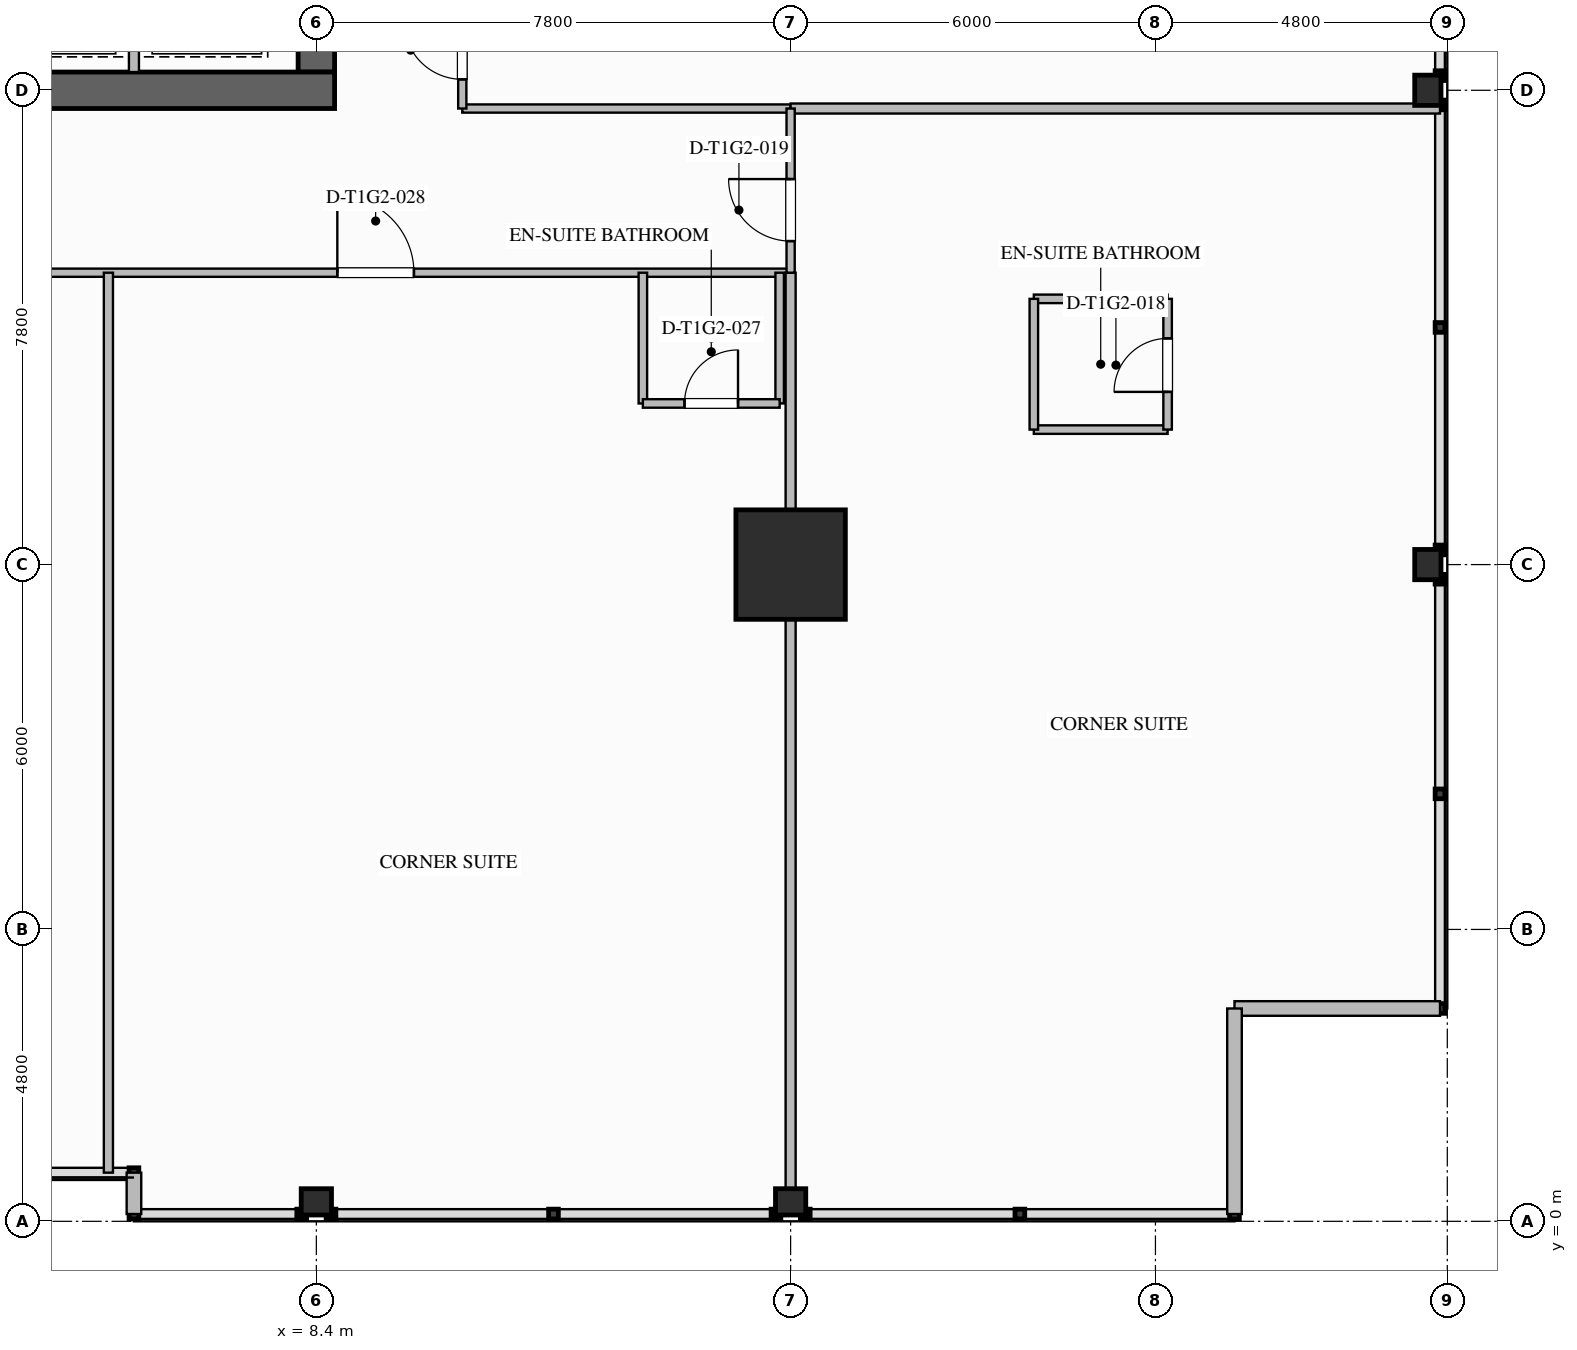
"""IFC4 building model, lengths in metres.
Left out: names, types, materials, properties, quantities, classifications, styles, units other than length and angle.
Written with IfcOpenShell. Run it as: python <this file> out.ifc"""

import sys

from ifc_helpers import new_model, si_unit, direction, frame, frame_2d, origin, origin_2d, place, context, subcontext, project, spatial, rectangle, i_section, extrude, element, fill, save


model = new_model("IFC4")
c1 = context("Model", 3, precision=1e-05, world=origin(), true_north=direction((0.0, 1.0)))
c2 = subcontext(c1, "Body", "Model", "MODEL_VIEW")
j1 = project(units=[si_unit("LENGTHUNIT", "METRE"), si_unit("PLANEANGLEUNIT", "RADIAN")], contexts=[c1])
p1 = place(None, origin())
s1 = spatial("IfcSite", under=j1, at=p1, CompositionType="ELEMENT")
p2 = place(p1, origin())
s2 = spatial("IfcBuilding", under=s1, at=p2, CompositionType="ELEMENT")
p3 = place(p2, frame((0.0, 0.0, 43.7)))
s3 = spatial("IfcBuildingStorey", under=s2, at=p3, CompositionType="ELEMENT", Elevation=43.7)
p4 = place(p3, frame((8.4, 35.1, 0.0), z_axis=(0.0, 0.0, 1.0), x_axis=(0.0, -1.0, 0.0)))
e1 = element("IfcWall", 1, at=p4, inside=s3, PredefinedType="SHEAR", context=c2, shape_type="SweptSolid", body=[
    extrude(rectangle(XDim=16.2, YDim=0.6, at=frame_2d((8.1, 0.0))), origin(), (0.0, 0.0, 1.0), 3.5),
])
p5 = place(p4, frame((3.08, 0.0, 0.0)))
e2 = element("IfcOpeningElement", 2, at=p5, cuts=e1, PredefinedType="OPENING", context=c2, shape_type="SweptSolid", body=[
    extrude(rectangle(XDim=1.12, YDim=2.1, at=frame_2d((0.56, 1.05))), frame((0.0, 0.31, 0.0), z_axis=(0.0, -1.0, 0.0), x_axis=(1.0, 0.0, 0.0)), (0.0, 0.0, 1.0), 0.62),
])
p6 = place(p3, frame((8.7, 18.6, 0.0), z_axis=(0.0, 0.0, 1.0), x_axis=(-1.0, 0.0, 0.0)))
e3 = element("IfcWall", 3, at=p6, inside=s3, PredefinedType="SHEAR", context=c2, shape_type="SweptSolid", body=[
    extrude(rectangle(XDim=17.4, YDim=0.6, at=frame_2d((8.7, 0.0))), origin(), (0.0, 0.0, 1.0), 3.5),
])
p7 = place(p3, frame((16.2, 10.8, 0.0), z_axis=(0.0, 0.0, 1.0), x_axis=(1.0, 0.0, 0.0)))
e4 = element("IfcColumn", 4, at=p7, inside=s3, PredefinedType="COLUMN", context=c2, shape_type="SweptSolid", body=[
    extrude(rectangle(XDim=1.8, YDim=1.8, at=origin_2d()), origin(), (0.0, 0.0, 1.0), 3.5),
])
for number, where, z_axis, x_axis in (
    (5, (26.68, 10.8, 0.0), (0.0, 0.0, 1.0), (1.0, 0.0, 0.0)),
    (6, (26.68, 18.6, 0.0), (0.0, 0.0, 1.0), (1.0, 0.0, 0.0)),
    (7, (8.4, 0.32, 0.0), (0.0, 0.0, 1.0), (0.0, 1.0, 0.0)),
    (8, (16.2, 0.32, 0.0), (0.0, 0.0, 1.0), (0.0, 1.0, 0.0)),
):
    element("IfcColumn", number, at=place(p3, frame(where, z_axis=z_axis, x_axis=x_axis)), inside=s3, PredefinedType="COLUMN", context=c2, shape_type="SweptSolid", body=[
        extrude(i_section(OverallWidth=0.432, OverallDepth=0.498, WebThickness=0.056, FlangeThickness=0.089, FilletRadius=0.03, at=origin_2d()), origin(), (0.0, 0.0, 1.0), 3.497),
    ])
for number, where, z_axis, x_axis in (
    (9, (26.88, 3.5, 0.0), (0.0, 0.0, 1.0), (-1.0, 0.0, 0.0)),
    (10, (23.5, 3.5, 0.0), (0.0, 0.0, 1.0), (0.0, -1.0, 0.0)),
):
    element("IfcWall", number, at=place(p3, frame(where, z_axis=z_axis, x_axis=x_axis)), inside=s3, PredefinedType="STANDARD", context=c2, shape_type="SweptSolid", body=[
        extrude(rectangle(XDim=3.38, YDim=0.24, at=frame_2d((1.69, 0.0))), origin(), (0.0, 0.0, 1.0), 3.24),
    ])
p8 = place(p3, frame((5.4, 0.12, 0.0), z_axis=(0.0, 0.0, 1.0), x_axis=(0.0, 1.0, 0.0)))
e11 = element("IfcWall", 11, at=p8, inside=s3, PredefinedType="STANDARD", context=c2, shape_type="SweptSolid", body=[
    extrude(rectangle(XDim=0.68, YDim=0.24, at=frame_2d((0.34, 0.0))), origin(), (0.0, 0.0, 1.0), 3.24),
])
p9 = place(p3, frame((5.4, 18.9, 0.0), z_axis=(0.0, 0.0, 1.0), x_axis=(0.0, 1.0, 0.0)))
e12 = element("IfcWall", 12, at=p9, inside=s3, PredefinedType="PARTITIONING", context=c2, shape_type="SweptSolid", body=[
    extrude(rectangle(XDim=2.88, YDim=0.165, at=frame_2d((1.44, 0.0))), origin(), (0.0, 0.0, 1.0), 3.24),
])
p10 = place(p3, frame((-16.2, 15.6, 0.0), z_axis=(0.0, 0.0, 1.0), x_axis=(1.0, 0.0, 0.0)))
e13 = element("IfcWall", 13, at=p10, inside=s3, PredefinedType="PARTITIONING", context=c2, shape_type="SweptSolid", body=[
    extrude(rectangle(XDim=32.4, YDim=0.135, at=frame_2d((16.2, 0.0))), origin(), (0.0, 0.0, 1.0), 3.24),
])
p11 = place(p10, frame((4.23, 0.0, 0.0)))
e14 = element("IfcOpeningElement", 14, at=p11, cuts=e13, PredefinedType="OPENING", context=c2, shape_type="SweptSolid", body=[
    extrude(rectangle(XDim=1.26, YDim=2.2, at=frame_2d((0.63, 1.1))), frame((0.0, 0.077, 0.0), z_axis=(0.0, -1.0, 0.0), x_axis=(1.0, 0.0, 0.0)), (0.0, 0.0, 1.0), 0.155),
])
p12 = place(p10, frame((16.155, 0.0, 0.0)))
e15 = element("IfcOpeningElement", 15, at=p12, cuts=e13, PredefinedType="OPENING", context=c2, shape_type="SweptSolid", body=[
    extrude(rectangle(XDim=1.02, YDim=2.15, at=frame_2d((0.51, 1.075))), frame((0.0, 0.077, 0.0), z_axis=(0.0, -1.0, 0.0), x_axis=(1.0, 0.0, 0.0)), (0.0, 0.0, 1.0), 0.155),
])
p13 = place(p10, frame((24.945, 0.0, 0.0)))
e16 = element("IfcOpeningElement", 16, at=p13, cuts=e13, PredefinedType="OPENING", context=c2, shape_type="SweptSolid", body=[
    extrude(rectangle(XDim=1.26, YDim=2.2, at=frame_2d((0.63, 1.1))), frame((0.0, 0.077, 0.0), z_axis=(0.0, -1.0, 0.0), x_axis=(1.0, 0.0, 0.0)), (0.0, 0.0, 1.0), 0.155),
])
p14 = place(p3, frame((10.8, 18.3, 0.0), z_axis=(0.0, 0.0, 1.0), x_axis=(1.0, 0.0, 0.0)))
e17 = element("IfcWall", 17, at=p14, inside=s3, PredefinedType="PARTITIONING", context=c2, shape_type="SweptSolid", body=[
    extrude(rectangle(XDim=5.4, YDim=0.135, at=frame_2d((2.7, 0.0))), origin(), (0.0, 0.0, 1.0), 3.24),
])
p15 = place(p3, frame((10.8, 18.3, 0.0), z_axis=(0.0, 0.0, 1.0), x_axis=(0.0, 1.0, 0.0)))
e18 = element("IfcWall", 18, at=p15, inside=s3, PredefinedType="PARTITIONING", context=c2, shape_type="SweptSolid", body=[
    extrude(rectangle(XDim=17.4, YDim=0.135, at=frame_2d((8.7, 0.0))), origin(), (0.0, 0.0, 1.0), 3.24),
])
p16 = place(p15, frame((0.48, 0.0, 0.0)))
e19 = element("IfcOpeningElement", 19, at=p16, cuts=e18, PredefinedType="OPENING", context=c2, shape_type="SweptSolid", body=[
    extrude(rectangle(XDim=0.96, YDim=2.15, at=frame_2d((0.48, 1.075))), frame((0.0, 0.077, 0.0), z_axis=(0.0, -1.0, 0.0), x_axis=(1.0, 0.0, 0.0)), (0.0, 0.0, 1.0), 0.155),
])
p17 = place(p15, frame((4.83, 0.0, 0.0)))
e20 = element("IfcOpeningElement", 20, at=p17, cuts=e18, PredefinedType="OPENING", context=c2, shape_type="SweptSolid", body=[
    extrude(rectangle(XDim=0.96, YDim=2.15, at=frame_2d((0.48, 1.075))), frame((0.0, 0.077, 0.0), z_axis=(0.0, -1.0, 0.0), x_axis=(1.0, 0.0, 0.0)), (0.0, 0.0, 1.0), 0.155),
])
p18 = place(p15, frame((9.18, 0.0, 0.0)))
e21 = element("IfcOpeningElement", 21, at=p18, cuts=e18, PredefinedType="OPENING", context=c2, shape_type="SweptSolid", body=[
    extrude(rectangle(XDim=0.96, YDim=2.15, at=frame_2d((0.48, 1.075))), frame((0.0, 0.077, 0.0), z_axis=(0.0, -1.0, 0.0), x_axis=(1.0, 0.0, 0.0)), (0.0, 0.0, 1.0), 0.155),
])
p19 = place(p15, frame((13.53, 0.0, 0.0)))
e22 = element("IfcOpeningElement", 22, at=p19, cuts=e18, PredefinedType="OPENING", context=c2, shape_type="SweptSolid", body=[
    extrude(rectangle(XDim=0.96, YDim=2.15, at=frame_2d((0.48, 1.075))), frame((0.0, 0.077, 0.0), z_axis=(0.0, -1.0, 0.0), x_axis=(1.0, 0.0, 0.0)), (0.0, 0.0, 1.0), 0.155),
])
p20 = place(p3, frame((16.2, 0.12, 0.0), z_axis=(0.0, 0.0, 1.0), x_axis=(0.0, 1.0, 0.0)))
e23 = element("IfcWall", 23, at=p20, inside=s3, PredefinedType="PARTITIONING", context=c2, shape_type="SweptSolid", body=[
    extrude(rectangle(XDim=15.48, YDim=0.165, at=frame_2d((7.74, 0.0))), origin(), (0.0, 0.0, 1.0), 2.298),
])
p21 = place(p3, frame((16.2, 18.3, 0.0), z_axis=(0.0, 0.0, 1.0), x_axis=(1.0, 0.0, 0.0)))
e24 = element("IfcWall", 24, at=p21, inside=s3, PredefinedType="PARTITIONING", context=c2, shape_type="SweptSolid", body=[
    extrude(rectangle(XDim=10.68, YDim=0.165, at=frame_2d((5.34, 0.0))), origin(), (0.0, 0.0, 1.0), 2.298),
])
p22 = place(p3, frame((16.2, 15.6, 0.0), z_axis=(0.0, 0.0, 1.0), x_axis=(0.0, 1.0, 0.0)))
e25 = element("IfcWall", 25, at=p22, inside=s3, PredefinedType="PARTITIONING", context=c2, shape_type="SweptSolid", body=[
    extrude(rectangle(XDim=2.7, YDim=0.135, at=frame_2d((1.35, 0.0))), origin(), (0.0, 0.0, 1.0), 2.298),
])
p23 = place(p22, frame((0.52, 0.0, 0.0)))
e26 = element("IfcOpeningElement", 26, at=p23, cuts=e25, PredefinedType="OPENING", context=c2, shape_type="SweptSolid", body=[
    extrude(rectangle(XDim=1.02, YDim=2.15, at=frame_2d((0.51, 1.075))), frame((0.0, 0.077, 0.0), z_axis=(0.0, -1.0, 0.0), x_axis=(1.0, 0.0, 0.0)), (0.0, 0.0, 1.0), 0.155),
])
for number, where, z_axis, x_axis in (
    (27, (20.2, 13.02, 0.0), (0.0, 0.0, 1.0), (1.0, 0.0, 0.0)),
    (28, (20.2, 15.17, 0.0), (0.0, 0.0, 1.0), (1.0, 0.0, 0.0)),
):
    element("IfcWall", number, at=place(p3, frame(where, z_axis=z_axis, x_axis=x_axis)), inside=s3, PredefinedType="PLUMBINGWALL", context=c2, shape_type="SweptSolid", body=[
        extrude(rectangle(XDim=2.2, YDim=0.14, at=frame_2d((1.1, 0.0))), origin(), (0.0, 0.0, 1.0), 3.24),
    ])
p24 = place(p3, frame((20.2, 13.02, 0.0), z_axis=(0.0, 0.0, 1.0), x_axis=(0.0, 1.0, 0.0)))
e29 = element("IfcWall", 29, at=p24, inside=s3, PredefinedType="PLUMBINGWALL", context=c2, shape_type="SweptSolid", body=[
    extrude(rectangle(XDim=2.15, YDim=0.14, at=frame_2d((1.075, 0.0))), origin(), (0.0, 0.0, 1.0), 3.24),
])
p25 = place(p3, frame((22.4, 13.02, 0.0), z_axis=(0.0, 0.0, 1.0), x_axis=(0.0, 1.0, 0.0)))
e30 = element("IfcWall", 30, at=p25, inside=s3, PredefinedType="PLUMBINGWALL", context=c2, shape_type="SweptSolid", body=[
    extrude(rectangle(XDim=2.15, YDim=0.14, at=frame_2d((1.075, 0.0))), origin(), (0.0, 0.0, 1.0), 3.24),
])
p26 = place(p25, frame((0.62, 0.0, 0.0)))
e31 = element("IfcOpeningElement", 31, at=p26, cuts=e30, PredefinedType="OPENING", context=c2, shape_type="SweptSolid", body=[
    extrude(rectangle(XDim=0.88, YDim=2.1, at=frame_2d((0.44, 1.05))), frame((0.0, 0.08, 0.0), z_axis=(0.0, -1.0, 0.0), x_axis=(1.0, 0.0, 0.0)), (0.0, 0.0, 1.0), 0.16),
])
p27 = place(p3, frame((4.98, 0.8, 0.0), z_axis=(0.0, 0.0, 1.0), x_axis=(0.0, 1.0, 0.0)))
e32 = element("IfcWall", 32, at=p27, inside=s3, PredefinedType="PARTITIONING", context=c2, shape_type="SweptSolid", body=[
    extrude(rectangle(XDim=14.8, YDim=0.15, at=frame_2d((7.4, 0.0))), origin(), (0.0, 0.0, 1.0), 3.24),
])
p28 = place(p3, frame((13.77, 15.6, 0.0), z_axis=(0.0, 0.0, 1.0), x_axis=(0.0, -1.0, 0.0)))
e33 = element("IfcWall", 33, at=p28, inside=s3, PredefinedType="PLUMBINGWALL", context=c2, shape_type="SweptSolid", body=[
    extrude(rectangle(XDim=2.15, YDim=0.14, at=frame_2d((1.075, 0.0))), origin(), (0.0, 0.0, 1.0), 3.24),
])
p29 = place(p3, frame((16.02, 15.6, 0.0), z_axis=(0.0, 0.0, 1.0), x_axis=(0.0, -1.0, 0.0)))
e34 = element("IfcWall", 34, at=p29, inside=s3, PredefinedType="PLUMBINGWALL", context=c2, shape_type="SweptSolid", body=[
    extrude(rectangle(XDim=2.15, YDim=0.14, at=frame_2d((1.075, 0.0))), origin(), (0.0, 0.0, 1.0), 2.298),
])
p30 = place(p3, frame((13.77, 13.45, 0.0), z_axis=(0.0, 0.0, 1.0), x_axis=(1.0, 0.0, 0.0)))
e35 = element("IfcWall", 35, at=p30, inside=s3, PredefinedType="PLUMBINGWALL", context=c2, shape_type="SweptSolid", body=[
    extrude(rectangle(XDim=2.25, YDim=0.14, at=frame_2d((1.125, 0.0))), origin(), (0.0, 0.0, 1.0), 3.24),
])
p31 = place(p30, frame((0.685, 0.0, 0.0)))
e36 = element("IfcOpeningElement", 36, at=p31, cuts=e35, PredefinedType="OPENING", context=c2, shape_type="SweptSolid", body=[
    extrude(rectangle(XDim=0.88, YDim=2.1, at=frame_2d((0.44, 1.05))), frame((0.0, 0.08, 0.0), z_axis=(0.0, -1.0, 0.0), x_axis=(1.0, 0.0, 0.0)), (0.0, 0.0, 1.0), 0.16),
])
p32 = place(p26, origin())
e37 = element("IfcDoor", 37, at=p32, inside=s3, OperationType="SINGLE_SWING_LEFT", PredefinedType="DOOR", context=c2, shape_type="SweptSolid", body=[
    extrude(rectangle(XDim=0.88, YDim=2.1, at=frame_2d((0.44, 1.05))), frame((0.0, 0.025, 0.0), z_axis=(0.0, -1.0, 0.0), x_axis=(1.0, 0.0, 0.0)), (0.0, 0.0, 1.0), 0.05),
])
fill(e31, e37)
p33 = place(p23, origin())
e38 = element("IfcDoor", 38, at=p33, inside=s3, OperationType="SINGLE_SWING_RIGHT", PredefinedType="DOOR", context=c2, shape_type="SweptSolid", body=[
    extrude(rectangle(XDim=1.02, YDim=2.15, at=frame_2d((0.51, 1.075))), frame((0.0, 0.025, 0.0), z_axis=(0.0, -1.0, 0.0), x_axis=(1.0, 0.0, 0.0)), (0.0, 0.0, 1.0), 0.05),
])
fill(e26, e38)
p34 = place(p31, origin())
e39 = element("IfcDoor", 39, at=p34, inside=s3, OperationType="SINGLE_SWING_RIGHT", PredefinedType="DOOR", context=c2, shape_type="SweptSolid", body=[
    extrude(rectangle(XDim=0.88, YDim=2.1, at=frame_2d((0.44, 1.05))), frame((0.0, 0.025, 0.0), z_axis=(0.0, -1.0, 0.0), x_axis=(1.0, 0.0, 0.0)), (0.0, 0.0, 1.0), 0.05),
])
fill(e36, e39)
p35 = place(p13, origin())
e40 = element("IfcDoor", 40, at=p35, inside=s3, OperationType="SINGLE_SWING_LEFT", PredefinedType="DOOR", context=c2, shape_type="SweptSolid", body=[
    extrude(rectangle(XDim=1.26, YDim=2.2, at=frame_2d((0.63, 1.1))), frame((0.0, 0.025, 0.0), z_axis=(0.0, -1.0, 0.0), x_axis=(1.0, 0.0, 0.0)), (0.0, 0.0, 1.0), 0.05),
])
fill(e16, e40)
p36 = place(p16, origin())
e41 = element("IfcDoor", 41, at=p36, inside=s3, OperationType="SINGLE_SWING_RIGHT", PredefinedType="DOOR", context=c2, shape_type="SweptSolid", body=[
    extrude(rectangle(XDim=0.96, YDim=2.15, at=frame_2d((0.48, 1.075))), frame((0.0, 0.025, 0.0), z_axis=(0.0, -1.0, 0.0), x_axis=(1.0, 0.0, 0.0)), (0.0, 0.0, 1.0), 0.05),
])
fill(e19, e41)
save(model, sys.argv[1])
